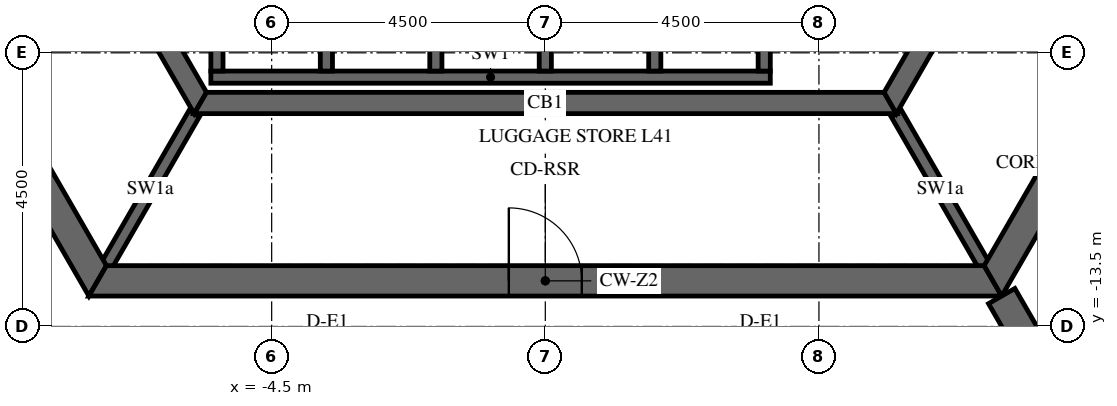
"""IFC4 building model, lengths in metres.
Left out: names, types, materials, properties, quantities, classifications, styles, units other than length and angle.
Written with IfcOpenShell. Run it as: python <this file> out.ifc"""

import sys

from ifc_helpers import new_model, si_unit, direction, frame, frame_2d, origin, place, context, subcontext, project, spatial, polyline, rectangle, outline, extrude, element, fill, save


model = new_model("IFC4")
c1 = context("Model", 3, precision=1e-05, world=origin(), true_north=direction((0.0, 1.0)))
c2 = subcontext(c1, "Body", "Model", "MODEL_VIEW")
j1 = project(units=[si_unit("LENGTHUNIT", "METRE"), si_unit("PLANEANGLEUNIT", "RADIAN")], contexts=[c1])
p1 = place(None, origin())
s1 = spatial("IfcSite", under=j1, at=p1, CompositionType="ELEMENT")
p2 = place(p1, origin())
s2 = spatial("IfcBuilding", under=s1, at=p2, CompositionType="ELEMENT")
p3 = place(p2, frame((0.0, 0.0, 176.1)))
s3 = spatial("IfcBuildingStorey", under=s2, at=p3, CompositionType="ELEMENT", Elevation=176.1)
p4 = place(p3, frame((-14.722, 0.0, -0.15), z_axis=(0.0, 0.0, 1.0), x_axis=(0.50000571537, -0.866022103989, 0.0)))
e1 = element("IfcWall", 1, at=p4, inside=s3, PredefinedType="SHEAR", context=c2, shape_type="SweptSolid", body=[
    extrude(outline(polyline([(-0.144, -0.25), (14.867, -0.25), (14.578, 0.25), (0.144, 0.25), (-0.144, -0.25)])), origin(), (0.0, 0.0, 1.0), 3.9),
])
p5 = place(p4, frame((6.432, 0.0, 0.15)))
e2 = element("IfcOpeningElement", 2, at=p5, cuts=e1, PredefinedType="OPENING", context=c2, shape_type="SweptSolid", body=[
    extrude(rectangle(XDim=1.8, YDim=2.4, at=frame_2d((0.9, 1.2))), frame((0.0, 0.26, 0.0), z_axis=(0.0, -1.0, 0.0), x_axis=(1.0, 0.0, 0.0)), (0.0, 0.0, 1.0), 0.52),
])
p6 = place(p3, frame((-7.361, -12.75, -0.15), z_axis=(0.0, 0.0, 1.0), x_axis=(1.0, 0.0, 0.0)))
e3 = element("IfcWall", 3, at=p6, inside=s3, PredefinedType="SHEAR", context=c2, shape_type="SweptSolid", body=[
    extrude(outline(polyline([(-0.144, -0.25), (14.866, -0.25), (14.578, 0.25), (0.144, 0.25), (-0.144, -0.25)])), origin(), (0.0, 0.0, 1.0), 3.9),
])
p7 = place(p6, frame((6.761, 0.0, 0.15)))
e4 = element("IfcOpeningElement", 4, at=p7, cuts=e3, PredefinedType="OPENING", context=c2, shape_type="SweptSolid", body=[
    extrude(rectangle(XDim=1.2, YDim=2.4, at=frame_2d((0.6, 1.2))), frame((0.0, 0.26, 0.0), z_axis=(0.0, -1.0, 0.0), x_axis=(1.0, 0.0, 0.0)), (0.0, 0.0, 1.0), 0.52),
])
p8 = place(p3, frame((7.361, -12.75, -0.15), z_axis=(0.0, 0.0, 1.0), x_axis=(0.50000571537, 0.866022103989, 0.0)))
e5 = element("IfcWall", 5, at=p8, inside=s3, PredefinedType="SHEAR", context=c2, shape_type="SweptSolid", body=[
    extrude(outline(polyline([(-0.144, -0.25), (14.867, -0.25), (14.578, 0.25), (0.144, 0.25), (-0.144, -0.25)])), origin(), (0.0, 0.0, 1.0), 3.9),
])
p9 = place(p8, frame((6.49, 0.0, 0.15)))
e6 = element("IfcOpeningElement", 6, at=p9, cuts=e5, PredefinedType="OPENING", context=c2, shape_type="SweptSolid", body=[
    extrude(rectangle(XDim=1.8, YDim=2.4, at=frame_2d((0.9, 1.2))), frame((0.0, 0.26, 0.0), z_axis=(0.0, -1.0, 0.0), x_axis=(1.0, 0.0, 0.0)), (0.0, 0.0, 1.0), 0.52),
])
p10 = place(p3, frame((7.506, -13.0, -0.15), z_axis=(0.0, 0.0, 1.0), x_axis=(0.499988271576, -0.866032175087, 0.0)))
e7 = element("IfcWall", 7, at=p10, inside=s3, PredefinedType="SHEAR", context=c2, shape_type="SweptSolid", body=[
    extrude(rectangle(XDim=15.424, YDim=0.5, at=frame_2d((7.712, 0.0))), origin(), (0.0, 0.0, 1.0), 3.9),
])
p11 = place(p10, frame((6.812, 0.0, 0.15)))
e8 = element("IfcOpeningElement", 8, at=p11, cuts=e7, PredefinedType="OPENING", context=c2, shape_type="SweptSolid", body=[
    extrude(rectangle(XDim=1.8, YDim=2.4, at=frame_2d((0.9, 1.2))), frame((0.0, 0.26, 0.0), z_axis=(0.0, -1.0, 0.0), x_axis=(1.0, 0.0, 0.0)), (0.0, 0.0, 1.0), 0.52),
])
p12 = place(p3, frame((-11.345, 0.0, -0.15), z_axis=(0.0, 0.0, 1.0), x_axis=(0.499995046907, -0.866028263435, 0.0)))
e9 = element("IfcWall", 9, at=p12, inside=s3, PredefinedType="SHEAR", context=c2, shape_type="SweptSolid", body=[
    extrude(outline(polyline([(-0.101, -0.175), (11.446, -0.175), (11.244, 0.175), (0.101, 0.175), (-0.101, -0.175)])), origin(), (0.0, 0.0, 1.0), 3.9),
])
p13 = place(p12, frame((4.744, 0.0, 0.15)))
e10 = element("IfcOpeningElement", 10, at=p13, cuts=e9, PredefinedType="OPENING", context=c2, shape_type="SweptSolid", body=[
    extrude(rectangle(XDim=1.8, YDim=2.4, at=frame_2d((0.9, 1.2))), frame((0.0, 0.185, 0.0), z_axis=(0.0, -1.0, 0.0), x_axis=(1.0, 0.0, 0.0)), (0.0, 0.0, 1.0), 0.37),
])
p14 = place(p3, frame((-5.673, -9.825, -0.15), z_axis=(0.0, 0.0, 1.0), x_axis=(1.0, 0.0, 0.0)))
e11 = element("IfcWall", 11, at=p14, inside=s3, PredefinedType="SHEAR", context=c2, shape_type="SweptSolid", body=[
    extrude(outline(polyline([(-0.101, -0.175), (11.446, -0.175), (11.244, 0.175), (0.101, 0.175), (-0.101, -0.175)])), origin(), (0.0, 0.0, 1.0), 3.9),
])
p15 = place(p3, frame((5.673, -9.825, -0.15), z_axis=(0.0, 0.0, 1.0), x_axis=(0.499995046907, 0.866028263435, 0.0)))
e12 = element("IfcWall", 12, at=p15, inside=s3, PredefinedType="SHEAR", context=c2, shape_type="SweptSolid", body=[
    extrude(outline(polyline([(-0.101, -0.175), (11.446, -0.175), (11.244, 0.175), (0.101, 0.175), (-0.101, -0.175)])), origin(), (0.0, 0.0, 1.0), 3.9),
])
p16 = place(p15, frame((4.801, 0.0, 0.15)))
e13 = element("IfcOpeningElement", 13, at=p16, cuts=e12, PredefinedType="OPENING", context=c2, shape_type="SweptSolid", body=[
    extrude(rectangle(XDim=1.8, YDim=2.4, at=frame_2d((0.9, 1.2))), frame((0.0, 0.185, 0.0), z_axis=(0.0, -1.0, 0.0), x_axis=(1.0, 0.0, 0.0)), (0.0, 0.0, 1.0), 0.37),
])
p17 = place(p3, frame((-5.5, -9.4, -0.25), z_axis=(0.0, 0.0, 1.0), x_axis=(1.0, 0.0, 0.0)))
e14 = element("IfcWall", 14, at=p17, inside=s3, PredefinedType="SHEAR", context=c2, shape_type="SweptSolid", body=[
    extrude(rectangle(XDim=9.2, YDim=0.2, at=frame_2d((4.6, 0.0))), origin(), (0.0, 0.0, 1.0), 3.9),
])
for number, where, z_axis, x_axis in (
    (15, (-5.4, -9.3, -0.25), (0.0, 0.0, 1.0), (0.0, 1.0, 0.0)),
    (16, (-3.6, -9.3, -0.25), (0.0, 0.0, 1.0), (0.0, 1.0, 0.0)),
    (17, (-1.8, -9.3, -0.25), (0.0, 0.0, 1.0), (0.0, 1.0, 0.0)),
    (18, (0.0, -9.3, -0.25), (0.0, 0.0, 1.0), (0.0, 1.0, 0.0)),
    (19, (1.8, -9.3, -0.25), (0.0, 0.0, 1.0), (0.0, 1.0, 0.0)),
    (20, (3.6, -9.3, -0.25), (0.0, 0.0, 1.0), (0.0, 1.0, 0.0)),
):
    element("IfcWall", number, at=place(p3, frame(where, z_axis=z_axis, x_axis=x_axis)), inside=s3, PredefinedType="SHEAR", context=c2, shape_type="SweptSolid", body=[
        extrude(rectangle(XDim=2.9, YDim=0.2, at=frame_2d((1.45, 0.0))), origin(), (0.0, 0.0, 1.0), 3.9),
    ])
for number, where, z_axis, x_axis in (
    (21, (-5.773, -10.0, -0.15), (0.0, 0.0, 1.0), (-0.5, -0.866, 0.0)),
    (22, (5.773, -10.0, -0.15), (0.0, 0.0, 1.0), (0.5, -0.866, 0.0)),
):
    element("IfcWall", number, at=place(p3, frame(where, z_axis=z_axis, x_axis=x_axis)), inside=s3, PredefinedType="SHEAR", context=c2, shape_type="SweptSolid", body=[
        extrude(rectangle(XDim=2.887, YDim=0.2, at=frame_2d((1.443, 0.0))), origin(), (0.0, 0.0, 1.0), 3.9),
    ])
p18 = place(p7, origin())
e23 = element("IfcDoor", 23, at=p18, inside=s3, OperationType="SINGLE_SWING_LEFT", PredefinedType="DOOR", context=c2, shape_type="SweptSolid", body=[
    extrude(rectangle(XDim=1.2, YDim=2.4, at=frame_2d((0.6, 1.2))), frame((0.0, 0.025, 0.0), z_axis=(0.0, -1.0, 0.0), x_axis=(1.0, 0.0, 0.0)), (0.0, 0.0, 1.0), 0.05),
])
fill(e4, e23)
save(model, sys.argv[1])
